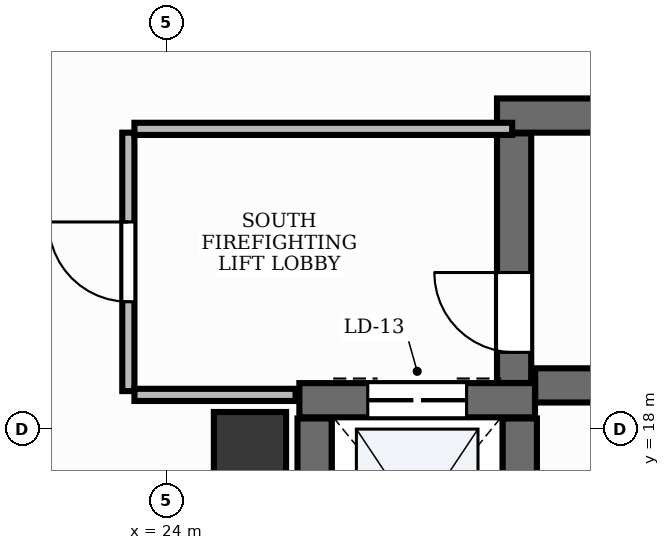
"""IFC4 building model, lengths in metres.
Left out: names, types, materials, properties, quantities, classifications, styles, units other than length and angle.
Written with IfcOpenShell. Run it as: python <this file> out.ifc"""

import sys

from ifc_helpers import new_model, si_unit, direction, frame, frame_2d, origin, origin_2d, place, context, subcontext, project, spatial, rectangle, extrude, element, fill, save


model = new_model("IFC4")
c1 = context("Model", 3, precision=1e-05, world=origin(), true_north=direction((0.0, 1.0)))
c2 = subcontext(c1, "Body", "Model", "MODEL_VIEW")
j1 = project(units=[si_unit("LENGTHUNIT", "METRE"), si_unit("PLANEANGLEUNIT", "RADIAN")], contexts=[c1])
p1 = place(None, origin())
s1 = spatial("IfcSite", under=j1, at=p1, CompositionType="ELEMENT")
p2 = place(p1, origin())
s2 = spatial("IfcBuilding", under=s1, at=p2, CompositionType="ELEMENT")
p3 = place(p2, frame((0.0, 0.0, 144.6)))
s3 = spatial("IfcBuildingStorey", under=s2, at=p3, CompositionType="ELEMENT", Elevation=144.6)
p4 = place(p3, frame((28.852, 18.575, 0.0), z_axis=(0.0, 0.0, 1.0), x_axis=(1.0, 0.0, 0.0)))
e1 = element("IfcWall", 1, at=p4, inside=s3, PredefinedType="SHEAR", context=c2, shape_type="SweptSolid", body=[
    extrude(rectangle(XDim=8.248, YDim=0.45, at=frame_2d((4.124, 0.0))), origin(), (0.0, 0.0, 1.0), 3.88),
])
p5 = place(p3, frame((28.35, 22.125, 0.0), z_axis=(0.0, 0.0, 1.0), x_axis=(1.0, 0.0, 0.0)))
e2 = element("IfcWall", 2, at=p5, inside=s3, PredefinedType="SHEAR", context=c2, shape_type="SweptSolid", body=[
    extrude(rectangle(XDim=8.75, YDim=0.45, at=frame_2d((4.375, 0.0))), origin(), (0.0, 0.0, 1.0), 3.88),
])
p6 = place(p3, frame((28.575, 18.607, 0.0), z_axis=(0.0, 0.0, 1.0), x_axis=(0.0, 1.0, 0.0)))
e3 = element("IfcWall", 3, at=p6, inside=s3, PredefinedType="SHEAR", context=c2, shape_type="SweptSolid", body=[
    extrude(rectangle(XDim=3.283, YDim=0.45, at=frame_2d((1.642, 0.0))), origin(), (0.0, 0.0, 1.0), 3.88),
])
p7 = place(p6, frame((0.403, 0.0, 0.0)))
e4 = element("IfcOpeningElement", 4, at=p7, cuts=e3, PredefinedType="OPENING", context=c2, shape_type="SweptSolid", body=[
    extrude(rectangle(XDim=1.05, YDim=2.15, at=frame_2d((0.525, 1.075))), frame((0.0, 0.24, 0.0), z_axis=(0.0, -1.0, 0.0), x_axis=(1.0, 0.0, 0.0)), (0.0, 0.0, 1.0), 0.48),
])
p8 = place(p3, frame((25.75, 18.38, 0.0), z_axis=(0.0, 0.0, 1.0), x_axis=(1.0, 0.0, 0.0)))
e5 = element("IfcWall", 5, at=p8, inside=s3, PredefinedType="SHEAR", context=c2, shape_type="SweptSolid", body=[
    extrude(rectangle(XDim=3.1, YDim=0.45, at=frame_2d((1.55, 0.0))), origin(), (0.0, 0.0, 1.0), 3.88),
])
p9 = place(p8, frame((0.9, 0.0, 0.0)))
e6 = element("IfcOpeningElement", 6, at=p9, cuts=e5, PredefinedType="OPENING", context=c2, shape_type="SweptSolid", body=[
    extrude(rectangle(XDim=1.3, YDim=2.2, at=frame_2d((0.65, 1.1))), frame((0.0, 0.24, 0.0), z_axis=(0.0, -1.0, 0.0), x_axis=(1.0, 0.0, 0.0)), (0.0, 0.0, 1.0), 0.48),
])
for number, where, z_axis, x_axis in (
    (7, (25.95, 15.44, 0.0), (0.0, 0.0, 1.0), (0.0, 1.0, 0.0)),
    (8, (28.65, 15.44, 0.0), (0.0, 0.0, 1.0), (0.0, 1.0, 0.0)),
):
    element("IfcWall", number, at=place(p3, frame(where, z_axis=z_axis, x_axis=x_axis)), inside=s3, PredefinedType="SHEAR", context=c2, shape_type="SweptSolid", body=[
        extrude(rectangle(XDim=2.7, YDim=0.45, at=frame_2d((1.35, 0.0))), origin(), (0.0, 0.0, 1.0), 3.88),
    ])
p10 = place(p3, frame((25.1, 17.75, -0.0), z_axis=(0.0, 0.0, 1.0), x_axis=(1.0, 0.0, 0.0)))
e9 = element("IfcColumn", 9, at=p10, inside=s3, PredefinedType="PILASTER", context=c2, shape_type="SweptSolid", body=[
    extrude(rectangle(XDim=0.95, YDim=0.95, at=origin_2d()), origin(), (0.0, 0.0, 1.0), 3.881),
])
p11 = place(p3, frame((23.5, 18.5, 0.0), z_axis=(0.0, 0.0, 1.0), x_axis=(0.0, 1.0, 0.0)))
e10 = element("IfcWall", 10, at=p11, inside=s3, PredefinedType="PARTITIONING", context=c2, shape_type="SweptSolid", body=[
    extrude(rectangle(XDim=3.4, YDim=0.16, at=frame_2d((1.7, 0.0))), origin(), (0.0, 0.0, 1.0), 2.22),
])
p12 = place(p11, frame((1.175, 0.0, 0.0)))
e11 = element("IfcOpeningElement", 11, at=p12, cuts=e10, PredefinedType="OPENING", context=c2, shape_type="SweptSolid", body=[
    extrude(rectangle(XDim=1.05, YDim=2.15, at=frame_2d((0.525, 1.075))), frame((0.0, 0.095, 0.0), z_axis=(0.0, -1.0, 0.0), x_axis=(1.0, 0.0, 0.0)), (0.0, 0.0, 1.0), 0.19),
])
p13 = place(p3, frame((23.58, 21.95, 0.0), z_axis=(0.0, 0.0, 1.0), x_axis=(1.0, 0.0, 0.0)))
e12 = element("IfcWall", 12, at=p13, inside=s3, PredefinedType="PARTITIONING", context=c2, shape_type="SweptSolid", body=[
    extrude(rectangle(XDim=4.97, YDim=0.16, at=frame_2d((2.485, 0.0))), origin(), (0.0, 0.0, 1.0), 2.22),
])
p14 = place(p3, frame((23.58, 18.45, 0.0), z_axis=(0.0, 0.0, 1.0), x_axis=(1.0, 0.0, 0.0)))
e13 = element("IfcWall", 13, at=p14, inside=s3, PredefinedType="PARTITIONING", context=c2, shape_type="SweptSolid", body=[
    extrude(rectangle(XDim=2.12, YDim=0.16, at=frame_2d((1.06, 0.0))), origin(), (0.0, 0.0, 1.0), 2.22),
])
p15 = place(p7, origin())
e14 = element("IfcDoor", 14, at=p15, inside=s3, OperationType="SINGLE_SWING_RIGHT", PredefinedType="DOOR", context=c2, shape_type="SweptSolid", body=[
    extrude(rectangle(XDim=1.05, YDim=2.15, at=frame_2d((0.525, 1.075))), frame((0.0, 0.025, 0.0), z_axis=(0.0, -1.0, 0.0), x_axis=(1.0, 0.0, 0.0)), (0.0, 0.0, 1.0), 0.05),
])
fill(e4, e14)
p16 = place(p9, origin())
e15 = element("IfcDoor", 15, at=p16, inside=s3, OperationType="DOUBLE_DOOR_SLIDING", PredefinedType="DOOR", context=c2, shape_type="SweptSolid", body=[
    extrude(rectangle(XDim=1.3, YDim=2.2, at=frame_2d((0.65, 1.1))), frame((0.0, 0.025, 0.0), z_axis=(0.0, -1.0, 0.0), x_axis=(1.0, 0.0, 0.0)), (0.0, 0.0, 1.0), 0.05),
])
fill(e6, e15)
p17 = place(p12, origin())
e16 = element("IfcDoor", 16, at=p17, inside=s3, OperationType="SINGLE_SWING_RIGHT", PredefinedType="DOOR", context=c2, shape_type="SweptSolid", body=[
    extrude(rectangle(XDim=1.05, YDim=2.15, at=frame_2d((0.525, 1.075))), frame((0.0, 0.025, 0.0), z_axis=(0.0, -1.0, 0.0), x_axis=(1.0, 0.0, 0.0)), (0.0, 0.0, 1.0), 0.05),
])
fill(e11, e16)
save(model, sys.argv[1])
